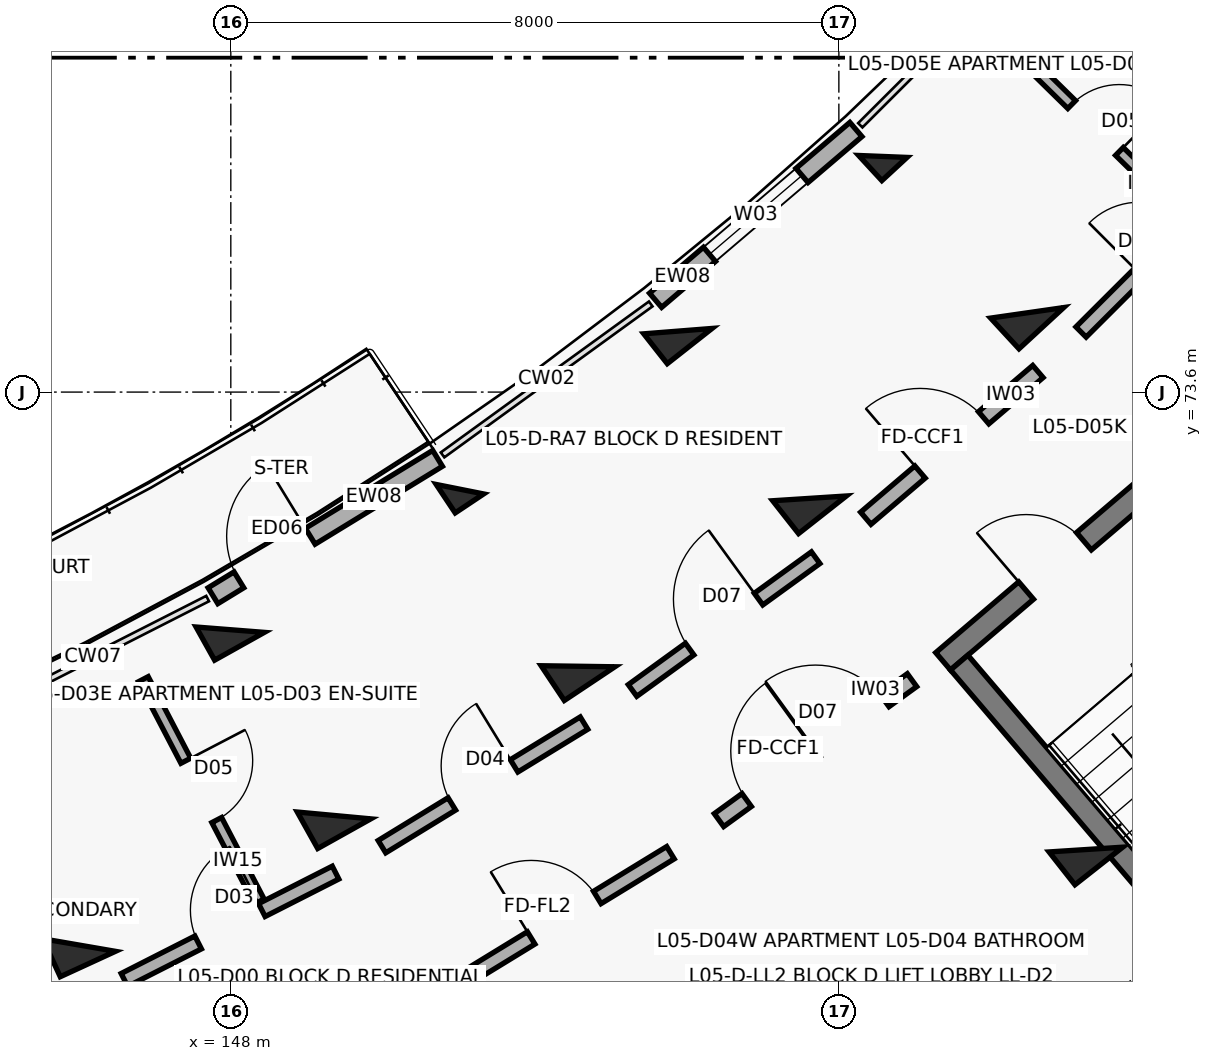
"""IFC4 building model, lengths in metres.
Left out: names, types, materials, properties, quantities, classifications, styles, units other than length and angle.
Written with IfcOpenShell. Run it as: python <this file> out.ifc"""

import sys

from ifc_helpers import new_model, si_unit, direction, frame, frame_2d, origin, origin_2d, place, context, subcontext, project, spatial, rectangle, extrude, element, fill, save


model = new_model("IFC4")
c1 = context("Model", 3, precision=1e-05, world=origin(), true_north=direction((0.0, 1.0)))
c2 = subcontext(c1, "Body", "Model", "MODEL_VIEW")
j1 = project(units=[si_unit("LENGTHUNIT", "METRE"), si_unit("PLANEANGLEUNIT", "RADIAN")], contexts=[c1])
p1 = place(None, origin())
s1 = spatial("IfcSite", under=j1, at=p1, CompositionType="ELEMENT")
p2 = place(p1, origin())
s2 = spatial("IfcBuilding", under=s1, at=p2, CompositionType="ELEMENT")
p3 = place(p2, frame((0.0, 0.0, 17.4)))
s3 = spatial("IfcBuildingStorey", under=s2, at=p3, CompositionType="ELEMENT", Elevation=17.4)
p4 = place(p3, frame((146.004, 66.324, 0.0), z_axis=(0.0, 0.0, 1.0), x_axis=(0.417867073801, -0.908508177527, 0.0)))
e1 = element("IfcColumn", 1, at=p4, inside=s3, PredefinedType="COLUMN", context=c2, shape_type="SweptSolid", body=[
    extrude(rectangle(XDim=0.55, YDim=0.8, at=origin_2d()), origin(), (0.0, 0.0, 1.0), 3.1),
])
p5 = place(p3, frame((147.992, 70.474, 0.0), z_axis=(0.0, 0.0, 1.0), x_axis=(0.487859659139, -0.87292207727, 0.0)))
e2 = element("IfcColumn", 2, at=p5, inside=s3, PredefinedType="COLUMN", context=c2, shape_type="SweptSolid", body=[
    extrude(rectangle(XDim=0.5, YDim=0.75, at=origin_2d()), origin(), (0.0, 0.0, 1.0), 3.1),
])
p6 = place(p3, frame((149.358, 68.03, 0.0), z_axis=(0.0, 0.0, 1.0), x_axis=(0.487859659139, -0.87292207727, 0.0)))
e3 = element("IfcColumn", 3, at=p6, inside=s3, PredefinedType="COLUMN", context=c2, shape_type="SweptSolid", body=[
    extrude(rectangle(XDim=0.55, YDim=0.8, at=origin_2d()), origin(), (0.0, 0.0, 1.0), 3.1),
])
p7 = place(p3, frame((151.015, 72.322, 0.0), z_axis=(0.0, 0.0, 1.0), x_axis=(0.554844427448, -0.83195412213, 0.0)))
e4 = element("IfcColumn", 4, at=p7, inside=s3, PredefinedType="COLUMN", context=c2, shape_type="SweptSolid", body=[
    extrude(rectangle(XDim=0.45, YDim=0.45, at=origin_2d()), origin(), (0.0, 0.0, 1.0), 3.1),
])
p8 = place(p3, frame((152.568, 69.993, 0.0), z_axis=(0.0, 0.0, 1.0), x_axis=(0.554844427448, -0.83195412213, 0.0)))
e5 = element("IfcColumn", 5, at=p8, inside=s3, PredefinedType="COLUMN", context=c2, shape_type="SweptSolid", body=[
    extrude(rectangle(XDim=0.55, YDim=0.8, at=origin_2d()), origin(), (0.0, 0.0, 1.0), 3.1),
])
p9 = place(p3, frame((153.883, 74.402, 0.0), z_axis=(0.0, 0.0, 1.0), x_axis=(0.618408395358, -0.785856893175, 0.0)))
e6 = element("IfcColumn", 6, at=p9, inside=s3, PredefinedType="COLUMN", context=c2, shape_type="SweptSolid", body=[
    extrude(rectangle(XDim=0.5, YDim=0.75, at=origin_2d()), origin(), (0.0, 0.0, 1.0), 3.1),
])
for number, where, z_axis, x_axis in (
    (7, (155.614, 72.202, 0.0), (0.0, 0.0, 1.0), (0.618, -0.786, 0.0)),
    (8, (159.25, 67.581, 0.0), (0.0, 0.0, 1.0), (0.618, -0.786, 0.0)),
):
    element("IfcColumn", number, at=place(p3, frame(where, z_axis=z_axis, x_axis=x_axis)), inside=s3, PredefinedType="COLUMN", context=c2, shape_type="SweptSolid", body=[
        extrude(rectangle(XDim=0.55, YDim=0.8, at=origin_2d()), origin(), (0.0, 0.0, 1.0), 3.1),
    ])
p10 = place(p3, frame((156.579, 76.701, 0.0), z_axis=(0.0, 0.0, 1.0), x_axis=(0.678159669868, -0.73491459515, 0.0)))
e9 = element("IfcColumn", 9, at=p10, inside=s3, PredefinedType="COLUMN", context=c2, shape_type="SweptSolid", body=[
    extrude(rectangle(XDim=0.45, YDim=0.45, at=origin_2d()), origin(), (0.0, 0.0, 1.0), 3.1),
])
p11 = place(p3, frame((158.477, 74.643, 0.0), z_axis=(0.0, 0.0, 1.0), x_axis=(0.678159669868, -0.73491459515, 0.0)))
e10 = element("IfcColumn", 10, at=p11, inside=s3, PredefinedType="COLUMN", context=c2, shape_type="SweptSolid", body=[
    extrude(rectangle(XDim=0.55, YDim=0.8, at=origin_2d()), origin(), (0.0, 0.0, 1.0), 3.1),
])
p12 = place(p3, frame((147.765, 70.921, 0.0), z_axis=(0.0, 0.0, 1.0), x_axis=(0.85310231885, 0.521743647371, 0.0)))
e11 = element("IfcWall", 11, at=p12, inside=s3, PredefinedType="SOLIDWALL", context=c2, shape_type="SweptSolid", body=[
    extrude(rectangle(XDim=3.464, YDim=0.245, at=frame_2d((1.732, 0.0))), origin(), (0.0, 0.0, 1.0), 2.25),
])
p13 = place(p12, frame((0.4, 0.0, 0.0)))
e12 = element("IfcOpeningElement", 12, at=p13, cuts=e11, PredefinedType="OPENING", context=c2, shape_type="SweptSolid", body=[
    extrude(rectangle(XDim=1.1, YDim=2.15, at=frame_2d((0.55, 1.075))), frame((0.0, 0.133, 0.0), z_axis=(0.0, -1.0, 0.0), x_axis=(1.0, 0.0, 0.0)), (0.0, 0.0, 1.0), 0.265),
])
p14 = place(p3, frame((153.589, 74.808, 0.0), z_axis=(0.0, 0.0, 1.0), x_axis=(0.760985425115, 0.648768974876, 0.0)))
e13 = element("IfcWall", 13, at=p14, inside=s3, PredefinedType="SOLIDWALL", context=c2, shape_type="SweptSolid", body=[
    extrude(rectangle(XDim=3.464, YDim=0.245, at=frame_2d((1.732, 0.0))), origin(), (0.0, 0.0, 1.0), 2.25),
])
p15 = place(p14, frame((0.932, 0.0, 0.32)))
e14 = element("IfcOpeningElement", 14, at=p15, cuts=e13, PredefinedType="OPENING", context=c2, shape_type="SweptSolid", body=[
    extrude(rectangle(XDim=1.6, YDim=1.5, at=frame_2d((0.8, 0.75))), frame((0.0, 0.133, 0.0), z_axis=(0.0, -1.0, 0.0), x_axis=(1.0, 0.0, 0.0)), (0.0, 0.0, 1.0), 0.265),
])
p16 = place(p3, frame((159.262, 79.041, 0.0), z_axis=(0.0, 0.0, 1.0), x_axis=(0.733738684326, -0.679431779595, 0.0)))
e15 = element("IfcWall", 15, at=p16, inside=s3, PredefinedType="SOLIDWALL", context=c2, shape_type="SweptSolid", body=[
    extrude(rectangle(XDim=8.2, YDim=0.265, at=frame_2d((4.1, 0.0))), origin(), (0.0, 0.0, 1.0), 2.18),
])
p17 = place(p16, frame((3.59, 0.0, 0.75)))
e16 = element("IfcOpeningElement", 16, at=p17, cuts=e15, PredefinedType="OPENING", context=c2, shape_type="SweptSolid", body=[
    extrude(rectangle(XDim=1.35, YDim=1.35, at=frame_2d((0.675, 0.675))), frame((0.0, 0.142, 0.0), z_axis=(0.0, -1.0, 0.0), x_axis=(1.0, 0.0, 0.0)), (0.0, 0.0, 1.0), 0.285),
])
p18 = place(p3, frame((157.372, 70.058, 0.0), z_axis=(0.0, 0.0, 1.0), x_axis=(0.760990583254, 0.648762924495, 0.0)))
e17 = element("IfcWall", 17, at=p18, inside=s3, PredefinedType="SHEAR", context=c2, shape_type="SweptSolid", body=[
    extrude(rectangle(XDim=3.87, YDim=0.3, at=frame_2d((1.935, 0.0))), origin(), (0.0, 0.0, 1.0), 3.1),
])
p19 = place(p18, frame((1.435, 0.0, 0.0)))
e18 = element("IfcOpeningElement", 18, at=p19, cuts=e17, PredefinedType="OPENING", context=c2, shape_type="SweptSolid", body=[
    extrude(rectangle(XDim=1.0, YDim=2.15, at=frame_2d((0.5, 1.075))), frame((0.0, 0.16, 0.0), z_axis=(0.0, -1.0, 0.0), x_axis=(1.0, 0.0, 0.0)), (0.0, 0.0, 1.0), 0.32),
])
p20 = place(p3, frame((157.583, 70.041, 0.0), z_axis=(0.0, 0.0, 1.0), x_axis=(0.648762810187, -0.760990680704, 0.0)))
e19 = element("IfcWall", 19, at=p20, inside=s3, PredefinedType="SHEAR", context=c2, shape_type="SweptSolid", body=[
    extrude(rectangle(XDim=7.69, YDim=0.3, at=frame_2d((3.845, 0.0))), origin(), (0.0, 0.0, 1.0), 3.1),
])
p21 = place(p3, frame((146.6, 65.865, 0.0), z_axis=(0.0, 0.0, 1.0), x_axis=(0.891414101388, 0.453189695212, 0.0)))
e20 = element("IfcWall", 20, at=p21, inside=s3, PredefinedType="SOLIDWALL", context=c2, shape_type="SweptSolid", body=[
    extrude(rectangle(XDim=3.116, YDim=0.19, at=frame_2d((1.558, 0.0))), origin(), (0.0, 0.0, 1.0), 2.08),
])
p22 = place(p21, frame((1.088, 0.0, 0.0)))
e21 = element("IfcOpeningElement", 21, at=p22, cuts=e20, PredefinedType="OPENING", context=c2, shape_type="SweptSolid", body=[
    extrude(rectangle(XDim=0.94, YDim=2.1, at=frame_2d((0.47, 1.05))), frame((0.0, 0.105, 0.0), z_axis=(0.0, -1.0, 0.0), x_axis=(1.0, 0.0, 0.0)), (0.0, 0.0, 1.0), 0.21),
])
p23 = place(p3, frame((146.849, 69.822, 0.0), z_axis=(0.0, 0.0, 1.0), x_axis=(0.462242343884, -0.886753638572, 0.0)))
e22 = element("IfcWall", 22, at=p23, inside=s3, PredefinedType="PARTITIONING", context=c2, shape_type="SweptSolid", body=[
    extrude(rectangle(XDim=3.3, YDim=0.145, at=frame_2d((1.65, 0.0))), origin(), (0.0, 0.0, 1.0), 2.08),
])
p24 = place(p23, frame((1.21, 0.0, 0.0)))
e23 = element("IfcOpeningElement", 23, at=p24, cuts=e22, PredefinedType="OPENING", context=c2, shape_type="SweptSolid", body=[
    extrude(rectangle(XDim=0.88, YDim=2.1, at=frame_2d((0.44, 1.05))), frame((0.0, 0.083, 0.0), z_axis=(0.0, -1.0, 0.0), x_axis=(1.0, 0.0, 0.0)), (0.0, 0.0, 1.0), 0.165),
])
p25 = place(p3, frame((150.989, 65.829, 0.0), z_axis=(0.0, 0.0, 1.0), x_axis=(0.853090237845, 0.521763400492, 0.0)))
e24 = element("IfcWall", 24, at=p25, inside=s3, PredefinedType="SOLIDWALL", context=c2, shape_type="SweptSolid", body=[
    extrude(rectangle(XDim=3.277, YDim=0.19, at=frame_2d((1.638, 0.0))), origin(), (0.0, 0.0, 1.0), 2.08),
])
p26 = place(p25, frame((1.128, 0.0, 0.0)))
e25 = element("IfcOpeningElement", 25, at=p26, cuts=e24, PredefinedType="OPENING", context=c2, shape_type="SweptSolid", body=[
    extrude(rectangle(XDim=1.02, YDim=2.15, at=frame_2d((0.51, 1.075))), frame((0.0, 0.105, 0.0), z_axis=(0.0, -1.0, 0.0), x_axis=(1.0, 0.0, 0.0)), (0.0, 0.0, 1.0), 0.21),
])
p27 = place(p3, frame((149.989, 67.619, 0.0), z_axis=(0.0, 0.0, 1.0), x_axis=(0.853121049608, 0.5217130195, 0.0)))
e26 = element("IfcWall", 26, at=p27, inside=s3, PredefinedType="SOLIDWALL", context=c2, shape_type="SweptSolid", body=[
    extrude(rectangle(XDim=3.116, YDim=0.19, at=frame_2d((1.558, 0.0))), origin(), (0.0, 0.0, 1.0), 2.08),
])
p28 = place(p27, frame((1.078, 0.0, 0.0)))
e27 = element("IfcOpeningElement", 27, at=p28, cuts=e26, PredefinedType="OPENING", context=c2, shape_type="SweptSolid", body=[
    extrude(rectangle(XDim=0.96, YDim=2.1, at=frame_2d((0.48, 1.05))), frame((0.0, 0.105, 0.0), z_axis=(0.0, -1.0, 0.0), x_axis=(1.0, 0.0, 0.0)), (0.0, 0.0, 1.0), 0.21),
])
p29 = place(p3, frame((154.423, 67.968, 0.0), z_axis=(0.0, 0.0, 1.0), x_axis=(0.809516127005, 0.587097641043, 0.0)))
e28 = element("IfcWall", 28, at=p29, inside=s3, PredefinedType="SOLIDWALL", context=c2, shape_type="SweptSolid", body=[
    extrude(rectangle(XDim=3.137, YDim=0.21, at=frame_2d((1.569, 0.0))), origin(), (0.0, 0.0, 1.0), 2.08),
])
p30 = place(p29, frame((0.45, 0.0, 0.0)))
e29 = element("IfcOpeningElement", 29, at=p30, cuts=e28, PredefinedType="OPENING", context=c2, shape_type="SweptSolid", body=[
    extrude(rectangle(XDim=1.1, YDim=2.15, at=frame_2d((0.55, 1.075))), frame((0.0, 0.115, 0.0), z_axis=(0.0, -1.0, 0.0), x_axis=(1.0, 0.0, 0.0)), (0.0, 0.0, 1.0), 0.23),
])
p31 = place(p29, frame((1.567, 0.0, 0.0)))
e30 = element("IfcOpeningElement", 30, at=p31, cuts=e28, PredefinedType="OPENING", context=c2, shape_type="SweptSolid", body=[
    extrude(rectangle(XDim=1.12, YDim=2.15, at=frame_2d((0.56, 1.075))), frame((0.0, 0.115, 0.0), z_axis=(0.0, -1.0, 0.0), x_axis=(1.0, 0.0, 0.0)), (0.0, 0.0, 1.0), 0.23),
])
p32 = place(p3, frame((153.285, 69.674, 0.0), z_axis=(0.0, 0.0, 1.0), x_axis=(0.809505174959, 0.587112741911, 0.0)))
e31 = element("IfcWall", 31, at=p32, inside=s3, PredefinedType="SOLIDWALL", context=c2, shape_type="SweptSolid", body=[
    extrude(rectangle(XDim=2.976, YDim=0.19, at=frame_2d((1.488, 0.0))), origin(), (0.0, 0.0, 1.0), 2.08),
])
p33 = place(p32, frame((0.928, 0.0, 0.0)))
e32 = element("IfcOpeningElement", 32, at=p33, cuts=e31, PredefinedType="OPENING", context=c2, shape_type="SweptSolid", body=[
    extrude(rectangle(XDim=1.12, YDim=2.15, at=frame_2d((0.56, 1.075))), frame((0.0, 0.105, 0.0), z_axis=(0.0, -1.0, 0.0), x_axis=(1.0, 0.0, 0.0)), (0.0, 0.0, 1.0), 0.21),
])
p34 = place(p3, frame((156.354, 71.94, 0.0), z_axis=(0.0, 0.0, 1.0), x_axis=(0.760991187621, 0.648762215579, 0.0)))
e33 = element("IfcWall", 33, at=p34, inside=s3, PredefinedType="SOLIDWALL", context=c2, shape_type="SweptSolid", body=[
    extrude(rectangle(XDim=2.976, YDim=0.21, at=frame_2d((1.488, 0.0))), origin(), (0.0, 0.0, 1.0), 2.08),
])
p35 = place(p34, frame((0.938, 0.0, 0.0)))
e34 = element("IfcOpeningElement", 34, at=p35, cuts=e33, PredefinedType="OPENING", context=c2, shape_type="SweptSolid", body=[
    extrude(rectangle(XDim=1.1, YDim=2.15, at=frame_2d((0.55, 1.075))), frame((0.0, 0.115, 0.0), z_axis=(0.0, -1.0, 0.0), x_axis=(1.0, 0.0, 0.0)), (0.0, 0.0, 1.0), 0.23),
])
p36 = place(p3, frame((159.186, 74.39, 0.0), z_axis=(0.0, 0.0, 1.0), x_axis=(0.70773330139, 0.706479705373, 0.0)))
e35 = element("IfcWall", 35, at=p36, inside=s3, PredefinedType="SOLIDWALL", context=c2, shape_type="SweptSolid", body=[
    extrude(rectangle(XDim=3.116, YDim=0.19, at=frame_2d((1.558, 0.0))), origin(), (0.0, 0.0, 1.0), 2.08),
])
p37 = place(p36, frame((1.088, 0.0, 0.0)))
e36 = element("IfcOpeningElement", 36, at=p37, cuts=e35, PredefinedType="OPENING", context=c2, shape_type="SweptSolid", body=[
    extrude(rectangle(XDim=0.94, YDim=2.1, at=frame_2d((0.47, 1.05))), frame((0.0, 0.105, 0.0), z_axis=(0.0, -1.0, 0.0), x_axis=(1.0, 0.0, 0.0)), (0.0, 0.0, 1.0), 0.21),
])
p38 = place(p3, frame((158.2, 78.23, 0.0), z_axis=(0.0, 0.0, 1.0), x_axis=(0.713587506757, -0.700566106945, 0.0)))
e37 = element("IfcWall", 37, at=p38, inside=s3, PredefinedType="PARTITIONING", context=c2, shape_type="SweptSolid", body=[
    extrude(rectangle(XDim=3.3, YDim=0.145, at=frame_2d((1.65, 0.0))), origin(), (0.0, 0.0, 1.0), 2.08),
])
p39 = place(p38, frame((1.21, 0.0, 0.0)))
e38 = element("IfcOpeningElement", 38, at=p39, cuts=e37, PredefinedType="OPENING", context=c2, shape_type="SweptSolid", body=[
    extrude(rectangle(XDim=0.88, YDim=2.1, at=frame_2d((0.44, 1.05))), frame((0.0, 0.083, 0.0), z_axis=(0.0, -1.0, 0.0), x_axis=(1.0, 0.0, 0.0)), (0.0, 0.0, 1.0), 0.165),
])
p40 = place(p13, origin())
e39 = element("IfcDoor", 39, at=p40, inside=s3, OperationType="SINGLE_SWING_RIGHT", PredefinedType="DOOR", context=c2, shape_type="SweptSolid", body=[
    extrude(rectangle(XDim=1.1, YDim=2.15, at=frame_2d((0.55, 1.075))), frame((0.0, 0.025, 0.0), z_axis=(0.0, -1.0, 0.0), x_axis=(1.0, 0.0, 0.0)), (0.0, 0.0, 1.0), 0.05),
])
fill(e12, e39)
p41 = place(p15, origin())
e40 = element("IfcWindow", 40, at=p41, inside=s3, PartitioningType="DOUBLE_PANEL_VERTICAL", PredefinedType="WINDOW", context=c2, shape_type="SweptSolid", body=[
    extrude(rectangle(XDim=1.6, YDim=1.5, at=frame_2d((0.8, 0.75))), frame((0.0, 0.03, 0.0), z_axis=(0.0, -1.0, 0.0), x_axis=(1.0, 0.0, 0.0)), (0.0, 0.0, 1.0), 0.06),
])
fill(e14, e40)
p42 = place(p19, origin())
e41 = element("IfcDoor", 41, at=p42, inside=s3, OperationType="SINGLE_SWING_LEFT", PredefinedType="DOOR", context=c2, shape_type="SweptSolid", body=[
    extrude(rectangle(XDim=1.0, YDim=2.15, at=frame_2d((0.5, 1.075))), frame((0.0, 0.025, 0.0), z_axis=(0.0, -1.0, 0.0), x_axis=(1.0, 0.0, 0.0)), (0.0, 0.0, 1.0), 0.05),
])
fill(e18, e41)
p43 = place(p22, origin())
e42 = element("IfcDoor", 42, at=p43, inside=s3, OperationType="SINGLE_SWING_RIGHT", PredefinedType="DOOR", context=c2, shape_type="SweptSolid", body=[
    extrude(rectangle(XDim=0.94, YDim=2.1, at=frame_2d((0.47, 1.05))), frame((0.0, 0.025, 0.0), z_axis=(0.0, -1.0, 0.0), x_axis=(1.0, 0.0, 0.0)), (0.0, 0.0, 1.0), 0.05),
])
fill(e21, e42)
p44 = place(p24, origin())
e43 = element("IfcDoor", 43, at=p44, inside=s3, OperationType="SINGLE_SWING_LEFT", PredefinedType="DOOR", context=c2, shape_type="SweptSolid", body=[
    extrude(rectangle(XDim=0.88, YDim=2.1, at=frame_2d((0.44, 1.05))), frame((0.0, 0.025, 0.0), z_axis=(0.0, -1.0, 0.0), x_axis=(1.0, 0.0, 0.0)), (0.0, 0.0, 1.0), 0.05),
])
fill(e23, e43)
p45 = place(p26, origin())
e44 = element("IfcDoor", 44, at=p45, inside=s3, OperationType="SINGLE_SWING_LEFT", PredefinedType="DOOR", context=c2, shape_type="SweptSolid", body=[
    extrude(rectangle(XDim=1.02, YDim=2.15, at=frame_2d((0.51, 1.075))), frame((0.0, 0.025, 0.0), z_axis=(0.0, -1.0, 0.0), x_axis=(1.0, 0.0, 0.0)), (0.0, 0.0, 1.0), 0.05),
])
fill(e25, e44)
p46 = place(p28, origin())
e45 = element("IfcDoor", 45, at=p46, inside=s3, OperationType="SINGLE_SWING_RIGHT", PredefinedType="DOOR", context=c2, shape_type="SweptSolid", body=[
    extrude(rectangle(XDim=0.96, YDim=2.1, at=frame_2d((0.48, 1.05))), frame((0.0, 0.025, 0.0), z_axis=(0.0, -1.0, 0.0), x_axis=(1.0, 0.0, 0.0)), (0.0, 0.0, 1.0), 0.05),
])
fill(e27, e45)
p47 = place(p30, origin())
e46 = element("IfcDoor", 46, at=p47, inside=s3, OperationType="SINGLE_SWING_RIGHT", PredefinedType="DOOR", context=c2, shape_type="SweptSolid", body=[
    extrude(rectangle(XDim=1.1, YDim=2.15, at=frame_2d((0.55, 1.075))), frame((0.0, 0.025, 0.0), z_axis=(0.0, -1.0, 0.0), x_axis=(1.0, 0.0, 0.0)), (0.0, 0.0, 1.0), 0.05),
])
fill(e29, e46)
p48 = place(p31, origin())
e47 = element("IfcDoor", 47, at=p48, inside=s3, OperationType="SINGLE_SWING_LEFT", PredefinedType="DOOR", context=c2, shape_type="SweptSolid", body=[
    extrude(rectangle(XDim=1.12, YDim=2.15, at=frame_2d((0.56, 1.075))), frame((0.0, 0.025, 0.0), z_axis=(0.0, -1.0, 0.0), x_axis=(1.0, 0.0, 0.0)), (0.0, 0.0, 1.0), 0.05),
])
fill(e30, e47)
p49 = place(p33, origin())
e48 = element("IfcDoor", 48, at=p49, inside=s3, OperationType="SINGLE_SWING_RIGHT", PredefinedType="DOOR", context=c2, shape_type="SweptSolid", body=[
    extrude(rectangle(XDim=1.12, YDim=2.15, at=frame_2d((0.56, 1.075))), frame((0.0, 0.025, 0.0), z_axis=(0.0, -1.0, 0.0), x_axis=(1.0, 0.0, 0.0)), (0.0, 0.0, 1.0), 0.05),
])
fill(e32, e48)
p50 = place(p35, origin())
e49 = element("IfcDoor", 49, at=p50, inside=s3, OperationType="SINGLE_SWING_LEFT", PredefinedType="DOOR", context=c2, shape_type="SweptSolid", body=[
    extrude(rectangle(XDim=1.1, YDim=2.15, at=frame_2d((0.55, 1.075))), frame((0.0, 0.025, 0.0), z_axis=(0.0, -1.0, 0.0), x_axis=(1.0, 0.0, 0.0)), (0.0, 0.0, 1.0), 0.05),
])
fill(e34, e49)
p51 = place(p39, origin())
e50 = element("IfcDoor", 50, at=p51, inside=s3, OperationType="SINGLE_SWING_RIGHT", PredefinedType="DOOR", context=c2, shape_type="SweptSolid", body=[
    extrude(rectangle(XDim=0.88, YDim=2.1, at=frame_2d((0.44, 1.05))), frame((0.0, 0.025, 0.0), z_axis=(0.0, -1.0, 0.0), x_axis=(1.0, 0.0, 0.0)), (0.0, 0.0, 1.0), 0.05),
])
fill(e38, e50)
save(model, sys.argv[1])
